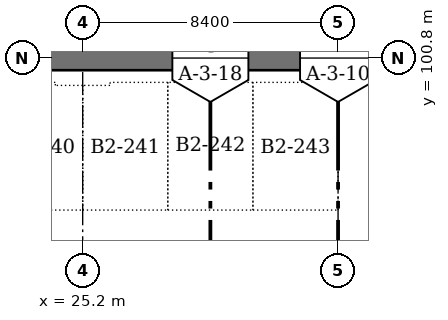
"""IFC4 building model, lengths in metres.
Left out: names, types, materials, properties, quantities, classifications, styles, units other than length and angle.
Written with IfcOpenShell. Run it as: python <this file> out.ifc"""

import sys

from ifc_helpers import new_model, si_unit, direction, frame, frame_2d, origin, place, context, subcontext, project, spatial, rectangle, extrude, element, save


model = new_model("IFC4")
c1 = context("Model", 3, precision=1e-05, world=origin(), true_north=direction((0.0, 1.0)))
c2 = subcontext(c1, "Body", "Model", "MODEL_VIEW")
j1 = project(units=[si_unit("LENGTHUNIT", "METRE"), si_unit("PLANEANGLEUNIT", "RADIAN")], contexts=[c1])
p1 = place(None, origin())
s1 = spatial("IfcSite", under=j1, at=p1, CompositionType="ELEMENT")
p2 = place(p1, origin())
s2 = spatial("IfcBuilding", under=s1, at=p2, CompositionType="ELEMENT")
p3 = place(p2, frame((0.0, 0.0, -8.0)))
s3 = spatial("IfcBuildingStorey", under=s2, at=p3, CompositionType="ELEMENT", Elevation=-8.0)
p4 = place(p3, frame((-8.8, 100.8, 0.0), z_axis=(0.0, 0.0, 1.0), x_axis=(1.0, 0.0, 0.0)))
e1 = element("IfcWall", 1, at=p4, inside=s3, PredefinedType="SOLIDWALL", context=c2, shape_type="SweptSolid", body=[
    extrude(rectangle(XDim=135.2, YDim=0.8, at=frame_2d((67.6, 0.0))), origin(), (0.0, 0.0, 1.0), 3.7),
])
save(model, sys.argv[1])
